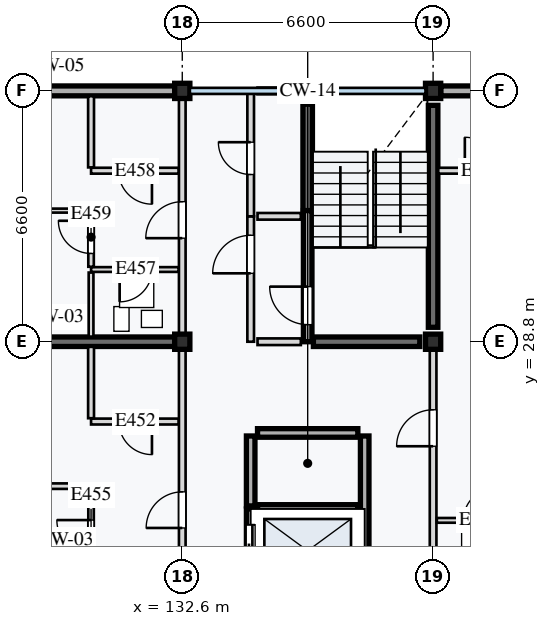
"""IFC4 building model, lengths in metres.
Left out: names, types, materials, properties, quantities, classifications, styles, units other than length and angle.
Written with IfcOpenShell. Run it as: python <this file> out.ifc"""

import sys

from ifc_helpers import new_model, si_unit, direction, frame, frame_2d, origin, origin_2d, place, context, subcontext, project, spatial, rectangle, extrude, element, fill, save


model = new_model("IFC4")
c1 = context("Model", 3, precision=1e-05, world=origin(), true_north=direction((0.0, 1.0)))
c2 = subcontext(c1, "Body", "Model", "MODEL_VIEW")
j1 = project(units=[si_unit("LENGTHUNIT", "METRE"), si_unit("PLANEANGLEUNIT", "RADIAN")], contexts=[c1])
p1 = place(None, origin())
s1 = spatial("IfcSite", under=j1, at=p1, CompositionType="ELEMENT")
p2 = place(p1, origin())
s2 = spatial("IfcBuilding", under=s1, at=p2, CompositionType="ELEMENT")
p3 = place(p2, frame((0.0, 0.0, 40.4)))
s3 = spatial("IfcBuildingStorey", under=s2, at=p3, CompositionType="ELEMENT", Elevation=40.4)
for number, where, z_axis, x_axis in (
    (1, (132.6, 28.8, 0.0), (0.0, 0.0, 1.0), (1.0, 0.0, 0.0)),
    (2, (139.2, 28.8, 0.0), (0.0, 0.0, 1.0), (1.0, 0.0, 0.0)),
    (3, (132.6, 35.4, 0.0), (0.0, 0.0, 1.0), (1.0, 0.0, 0.0)),
    (4, (139.2, 35.4, 0.0), (0.0, 0.0, 1.0), (1.0, 0.0, 0.0)),
):
    element("IfcColumn", number, at=place(p3, frame(where, z_axis=z_axis, x_axis=x_axis)), inside=s3, PredefinedType="COLUMN", context=c2, shape_type="SweptSolid", body=[
        extrude(rectangle(XDim=0.4, YDim=0.4, at=origin_2d()), origin(), (0.0, 0.0, 1.0), 3.2),
    ])
p4 = place(p3, frame((139.2, 29.18, 0.0), z_axis=(0.0, 0.0, 1.0), x_axis=(0.0, 1.0, 0.0)))
e5 = element("IfcWall", 5, at=p4, inside=s3, PredefinedType="SHEAR", context=c2, shape_type="SweptSolid", body=[
    extrude(rectangle(XDim=5.84, YDim=0.25, at=frame_2d((2.92, 0.0))), origin(), (0.0, 0.0, 1.0), 2.94),
])
for number, where, z_axis, x_axis in (
    (6, (135.9, 32.25, 0.0), (0.0, 0.0, 1.0), (0.0, 1.0, 0.0)),
    (7, (136.05, 28.8, 0.0), (0.0, 0.0, 1.0), (1.0, 0.0, 0.0)),
):
    element("IfcWall", number, at=place(p3, frame(where, z_axis=z_axis, x_axis=x_axis)), inside=s3, PredefinedType="SHEAR", context=c2, shape_type="SweptSolid", body=[
        extrude(rectangle(XDim=2.8, YDim=0.25, at=frame_2d((1.4, 0.0))), origin(), (0.0, 0.0, 1.0), 2.94),
    ])
p5 = place(p3, frame((126.2, 28.8, 0.0), z_axis=(0.0, 0.0, 1.0), x_axis=(1.0, 0.0, 0.0)))
e8 = element("IfcWall", 8, at=p5, inside=s3, PredefinedType="SHEAR", context=c2, shape_type="SweptSolid", body=[
    extrude(rectangle(XDim=6.2, YDim=0.25, at=frame_2d((3.1, 0.0))), origin(), (0.0, 0.0, 1.0), 2.94),
])
p6 = place(p3, frame((126.2, 35.4, 0.0), z_axis=(0.0, 0.0, 1.0), x_axis=(1.0, 0.0, 0.0)))
e9 = element("IfcWall", 9, at=p6, inside=s3, PredefinedType="STANDARD", context=c2, shape_type="SweptSolid", body=[
    extrude(rectangle(XDim=6.2, YDim=0.26, at=frame_2d((3.1, 0.0))), origin(), (0.0, 0.0, 1.0), 2.65),
])
p7 = place(p3, frame((139.4, 35.4, 0.0), z_axis=(0.0, 0.0, 1.0), x_axis=(1.0, 0.0, 0.0)))
e10 = element("IfcWall", 10, at=p7, inside=s3, PredefinedType="STANDARD", context=c2, shape_type="SweptSolid", body=[
    extrude(rectangle(XDim=4.07, YDim=0.26, at=frame_2d((2.035, 0.0))), origin(), (0.0, 0.0, 1.0), 2.65),
])
p8 = place(p3, frame((134.4, 22.335, 0.0), z_axis=(0.0, 0.0, 1.0), x_axis=(0.0, 1.0, 0.0)))
e11 = element("IfcWall", 11, at=p8, inside=s3, PredefinedType="STANDARD", context=c2, shape_type="SweptSolid", body=[
    extrude(rectangle(XDim=2.065, YDim=0.225, at=frame_2d((1.032, 0.0))), origin(), (0.0, 0.0, 1.0), 2.94),
])
p9 = place(p8, frame((0.55, 0.0, 0.0)))
e12 = element("IfcOpeningElement", 12, at=p9, cuts=e11, PredefinedType="OPENING", context=c2, shape_type="SweptSolid", body=[
    extrude(rectangle(XDim=1.1, YDim=2.1, at=frame_2d((0.55, 1.05))), frame((0.0, 0.123, 0.0), z_axis=(0.0, -1.0, 0.0), x_axis=(1.0, 0.0, 0.0)), (0.0, 0.0, 1.0), 0.245),
])
p10 = place(p3, frame((134.4, 24.48, 0.0), z_axis=(0.0, 0.0, 1.0), x_axis=(0.0, 1.0, 0.0)))
e13 = element("IfcWall", 13, at=p10, inside=s3, PredefinedType="STANDARD", context=c2, shape_type="SweptSolid", body=[
    extrude(rectangle(XDim=1.84, YDim=0.225, at=frame_2d((0.92, 0.0))), origin(), (0.0, 0.0, 1.0), 2.94),
])
p11 = place(p3, frame((137.4, 22.298, 0.0), z_axis=(0.0, 0.0, 1.0), x_axis=(0.0, 1.0, 0.0)))
e14 = element("IfcWall", 14, at=p11, inside=s3, PredefinedType="STANDARD", context=c2, shape_type="SweptSolid", body=[
    extrude(rectangle(XDim=4.022, YDim=0.225, at=frame_2d((2.011, 0.0))), origin(), (0.0, 0.0, 1.0), 2.94),
])
for number, where, z_axis, x_axis in (
    (15, (134.58, 24.4, 0.0), (0.0, 0.0, 1.0), (1.0, 0.0, 0.0)),
    (16, (134.58, 26.4, 0.0), (0.0, 0.0, 1.0), (1.0, 0.0, 0.0)),
):
    element("IfcWall", number, at=place(p3, frame(where, z_axis=z_axis, x_axis=x_axis)), inside=s3, PredefinedType="STANDARD", context=c2, shape_type="SweptSolid", body=[
        extrude(rectangle(XDim=2.64, YDim=0.225, at=frame_2d((1.32, 0.0))), origin(), (0.0, 0.0, 1.0), 2.94),
    ])
p12 = place(p3, frame((135.9, 28.8, 0.0), z_axis=(0.0, 0.0, 1.0), x_axis=(0.0, 1.0, 0.0)))
e17 = element("IfcWall", 17, at=p12, inside=s3, PredefinedType="STANDARD", context=c2, shape_type="SweptSolid", body=[
    extrude(rectangle(XDim=3.45, YDim=0.225, at=frame_2d((1.725, 0.0))), origin(), (0.0, 0.0, 1.0), 2.94),
])
p13 = place(p12, frame((0.45, 0.0, 0.0)))
e18 = element("IfcOpeningElement", 18, at=p13, cuts=e17, PredefinedType="OPENING", context=c2, shape_type="SweptSolid", body=[
    extrude(rectangle(XDim=1.0, YDim=2.1, at=frame_2d((0.5, 1.05))), frame((0.0, 0.123, 0.0), z_axis=(0.0, -1.0, 0.0), x_axis=(1.0, 0.0, 0.0)), (0.0, 0.0, 1.0), 0.245),
])
p14 = place(p3, frame((134.4, 28.8, 0.0), z_axis=(0.0, 0.0, 1.0), x_axis=(0.0, 1.0, 0.0)))
e19 = element("IfcWall", 19, at=p14, inside=s3, PredefinedType="PARTITIONING", context=c2, shape_type="SweptSolid", body=[
    extrude(rectangle(XDim=3.3, YDim=0.175, at=frame_2d((1.65, 0.0))), origin(), (0.0, 0.0, 1.0), 2.94),
])
p15 = place(p14, frame((1.8, 0.0, 0.0)))
e20 = element("IfcOpeningElement", 20, at=p15, cuts=e19, PredefinedType="OPENING", context=c2, shape_type="SweptSolid", body=[
    extrude(rectangle(XDim=1.0, YDim=2.16, at=frame_2d((0.5, 1.08))), frame((0.0, 0.097, 0.0), z_axis=(0.0, -1.0, 0.0), x_axis=(1.0, 0.0, 0.0)), (0.0, 0.0, 1.0), 0.195),
])
p16 = place(p3, frame((134.4, 32.1, 0.0), z_axis=(0.0, 0.0, 1.0), x_axis=(0.0, 1.0, 0.0)))
e21 = element("IfcWall", 21, at=p16, inside=s3, PredefinedType="PARTITIONING", context=c2, shape_type="SweptSolid", body=[
    extrude(rectangle(XDim=3.3, YDim=0.175, at=frame_2d((1.65, 0.0))), origin(), (0.0, 0.0, 1.0), 2.94),
])
p17 = place(p16, frame((1.1, 0.0, 0.0)))
e22 = element("IfcOpeningElement", 22, at=p17, cuts=e21, PredefinedType="OPENING", context=c2, shape_type="SweptSolid", body=[
    extrude(rectangle(XDim=0.85, YDim=2.0, at=frame_2d((0.425, 1.0))), frame((0.0, 0.097, 0.0), z_axis=(0.0, -1.0, 0.0), x_axis=(1.0, 0.0, 0.0)), (0.0, 0.0, 1.0), 0.195),
])
for number, where, z_axis, x_axis in (
    (23, (134.58, 28.8, 0.0), (0.0, 0.0, 1.0), (1.0, 0.0, 0.0)),
    (24, (134.58, 32.1, 0.0), (0.0, 0.0, 1.0), (1.0, 0.0, 0.0)),
):
    element("IfcWall", number, at=place(p3, frame(where, z_axis=z_axis, x_axis=x_axis)), inside=s3, PredefinedType="PARTITIONING", context=c2, shape_type="SweptSolid", body=[
        extrude(rectangle(XDim=1.14, YDim=0.175, at=frame_2d((0.57, 0.0))), origin(), (0.0, 0.0, 1.0), 2.94),
    ])
p18 = place(p3, frame((134.58, 35.4, 0.0), z_axis=(0.0, 0.0, 1.0), x_axis=(1.0, 0.0, 0.0)))
e25 = element("IfcWall", 25, at=p18, inside=s3, PredefinedType="PARTITIONING", context=c2, shape_type="SweptSolid", body=[
    extrude(rectangle(XDim=1.14, YDim=0.175, at=frame_2d((0.57, 0.0))), origin(), (0.0, 0.0, 1.0), 2.65),
])
p19 = place(p3, frame((132.6, 22.2, 0.0), z_axis=(0.0, 0.0, 1.0), x_axis=(0.0, 1.0, 0.0)))
e26 = element("IfcWall", 26, at=p19, inside=s3, PredefinedType="PARTITIONING", context=c2, shape_type="SweptSolid", body=[
    extrude(rectangle(XDim=6.6, YDim=0.175, at=frame_2d((3.3, 0.0))), origin(), (0.0, 0.0, 1.0), 2.55),
])
p20 = place(p19, frame((1.7, 0.0, 0.0)))
e27 = element("IfcOpeningElement", 27, at=p20, cuts=e26, PredefinedType="OPENING", context=c2, shape_type="SweptSolid", body=[
    extrude(rectangle(XDim=0.95, YDim=2.16, at=frame_2d((0.475, 1.08))), frame((0.0, 0.097, 0.0), z_axis=(0.0, -1.0, 0.0), x_axis=(1.0, 0.0, 0.0)), (0.0, 0.0, 1.0), 0.195),
])
p21 = place(p3, frame((132.502, 26.7, 0.0), z_axis=(0.0, 0.0, 1.0), x_axis=(-1.0, 0.0, 0.0)))
e28 = element("IfcWall", 28, at=p21, inside=s3, PredefinedType="PARTITIONING", context=c2, shape_type="SweptSolid", body=[
    extrude(rectangle(XDim=2.302, YDim=0.155, at=frame_2d((1.151, 0.0))), origin(), (0.0, 0.0, 1.0), 2.94),
])
p22 = place(p21, frame((0.7, 0.0, 0.0)))
e29 = element("IfcOpeningElement", 29, at=p22, cuts=e28, PredefinedType="OPENING", context=c2, shape_type="SweptSolid", body=[
    extrude(rectangle(XDim=0.87, YDim=2.08, at=frame_2d((0.435, 1.04))), frame((0.0, 0.087, 0.0), z_axis=(0.0, -1.0, 0.0), x_axis=(1.0, 0.0, 0.0)), (0.0, 0.0, 1.0), 0.175),
])
p23 = place(p3, frame((130.2, 26.788, 0.0), z_axis=(0.0, 0.0, 1.0), x_axis=(0.0, 1.0, 0.0)))
e30 = element("IfcWall", 30, at=p23, inside=s3, PredefinedType="PARTITIONING", context=c2, shape_type="SweptSolid", body=[
    extrude(rectangle(XDim=1.877, YDim=0.155, at=frame_2d((0.939, 0.0))), origin(), (0.0, 0.0, 1.0), 2.94),
])
p24 = place(p3, frame((130.2, 22.183, 0.0), z_axis=(0.0, 0.0, 1.0), x_axis=(0.0, 1.0, 0.0)))
e31 = element("IfcWall", 31, at=p24, inside=s3, PredefinedType="PARTITIONING", context=c2, shape_type="SweptSolid", body=[
    extrude(rectangle(XDim=2.817, YDim=0.145, at=frame_2d((1.409, 0.0))), origin(), (0.0, 0.0, 1.0), 2.94),
])
p25 = place(p24, frame((1.025, 0.0, 0.0)))
e32 = element("IfcOpeningElement", 32, at=p25, cuts=e31, PredefinedType="OPENING", context=c2, shape_type="SweptSolid", body=[
    extrude(rectangle(XDim=0.9, YDim=2.16, at=frame_2d((0.45, 1.08))), frame((0.0, 0.083, 0.0), z_axis=(0.0, -1.0, 0.0), x_axis=(1.0, 0.0, 0.0)), (0.0, 0.0, 1.0), 0.165),
])
p26 = place(p3, frame((130.117, 25.0, 0.0), z_axis=(0.0, 0.0, 1.0), x_axis=(-1.0, 0.0, 0.0)))
e33 = element("IfcWall", 33, at=p26, inside=s3, PredefinedType="PARTITIONING", context=c2, shape_type="SweptSolid", body=[
    extrude(rectangle(XDim=3.978, YDim=0.145, at=frame_2d((1.989, 0.0))), origin(), (0.0, 0.0, 1.0), 2.94),
])
p27 = place(p3, frame((132.6, 28.8, 0.0), z_axis=(0.0, 0.0, 1.0), x_axis=(0.0, 1.0, 0.0)))
e34 = element("IfcWall", 34, at=p27, inside=s3, PredefinedType="PARTITIONING", context=c2, shape_type="SweptSolid", body=[
    extrude(rectangle(XDim=6.6, YDim=0.175, at=frame_2d((3.3, 0.0))), origin(), (0.0, 0.0, 1.0), 2.55),
])
p28 = place(p27, frame((2.725, 0.0, 0.0)))
e35 = element("IfcOpeningElement", 35, at=p28, cuts=e34, PredefinedType="OPENING", context=c2, shape_type="SweptSolid", body=[
    extrude(rectangle(XDim=0.96, YDim=2.18, at=frame_2d((0.48, 1.09))), frame((0.0, 0.097, 0.0), z_axis=(0.0, -1.0, 0.0), x_axis=(1.0, 0.0, 0.0)), (0.0, 0.0, 1.0), 0.195),
])
p29 = place(p3, frame((132.502, 30.7, 0.0), z_axis=(0.0, 0.0, 1.0), x_axis=(-1.0, 0.0, 0.0)))
e36 = element("IfcWall", 36, at=p29, inside=s3, PredefinedType="PARTITIONING", context=c2, shape_type="SweptSolid", body=[
    extrude(rectangle(XDim=2.302, YDim=0.125, at=frame_2d((1.151, 0.0))), origin(), (0.0, 0.0, 1.0), 2.94),
])
p30 = place(p29, frame((0.7, 0.0, 0.0)))
e37 = element("IfcOpeningElement", 37, at=p30, cuts=e36, PredefinedType="OPENING", context=c2, shape_type="SweptSolid", body=[
    extrude(rectangle(XDim=0.85, YDim=2.04, at=frame_2d((0.425, 1.02))), frame((0.0, 0.073, 0.0), z_axis=(0.0, -1.0, 0.0), x_axis=(1.0, 0.0, 0.0)), (0.0, 0.0, 1.0), 0.145),
])
p31 = place(p3, frame((130.2, 28.935, 0.0), z_axis=(0.0, 0.0, 1.0), x_axis=(0.0, 1.0, 0.0)))
e38 = element("IfcWall", 38, at=p31, inside=s3, PredefinedType="PARTITIONING", context=c2, shape_type="SweptSolid", body=[
    extrude(rectangle(XDim=1.685, YDim=0.125, at=frame_2d((0.843, 0.0))), origin(), (0.0, 0.0, 1.0), 2.94),
])
p32 = place(p3, frame((132.502, 33.3, 0.0), z_axis=(0.0, 0.0, 1.0), x_axis=(-1.0, 0.0, 0.0)))
e39 = element("IfcWall", 39, at=p32, inside=s3, PredefinedType="PARTITIONING", context=c2, shape_type="SweptSolid", body=[
    extrude(rectangle(XDim=2.302, YDim=0.155, at=frame_2d((1.151, 0.0))), origin(), (0.0, 0.0, 1.0), 2.94),
])
p33 = place(p32, frame((0.7, 0.0, 0.0)))
e40 = element("IfcOpeningElement", 40, at=p33, cuts=e39, PredefinedType="OPENING", context=c2, shape_type="SweptSolid", body=[
    extrude(rectangle(XDim=0.88, YDim=2.16, at=frame_2d((0.44, 1.08))), frame((0.0, 0.087, 0.0), z_axis=(0.0, -1.0, 0.0), x_axis=(1.0, 0.0, 0.0)), (0.0, 0.0, 1.0), 0.175),
])
p34 = place(p3, frame((130.2, 33.387, 0.0), z_axis=(0.0, 0.0, 1.0), x_axis=(0.0, 1.0, 0.0)))
e41 = element("IfcWall", 41, at=p34, inside=s3, PredefinedType="PARTITIONING", context=c2, shape_type="SweptSolid", body=[
    extrude(rectangle(XDim=1.873, YDim=0.155, at=frame_2d((0.936, 0.0))), origin(), (0.0, 0.0, 1.0), 2.94),
])
p35 = place(p3, frame((130.2, 30.772, 0.0), z_axis=(0.0, 0.0, 1.0), x_axis=(0.0, 1.0, 0.0)))
e42 = element("IfcWall", 42, at=p35, inside=s3, PredefinedType="PARTITIONING", context=c2, shape_type="SweptSolid", body=[
    extrude(rectangle(XDim=1.478, YDim=0.145, at=frame_2d((0.739, 0.0))), origin(), (0.0, 0.0, 1.0), 2.94),
])
p36 = place(p35, frame((0.35, 0.0, 0.0)))
e43 = element("IfcOpeningElement", 43, at=p36, cuts=e42, PredefinedType="OPENING", context=c2, shape_type="SweptSolid", body=[
    extrude(rectangle(XDim=0.86, YDim=2.12, at=frame_2d((0.43, 1.06))), frame((0.0, 0.083, 0.0), z_axis=(0.0, -1.0, 0.0), x_axis=(1.0, 0.0, 0.0)), (0.0, 0.0, 1.0), 0.165),
])
p37 = place(p3, frame((130.117, 32.25, 0.0), z_axis=(0.0, 0.0, 1.0), x_axis=(-1.0, 0.0, 0.0)))
e44 = element("IfcWall", 44, at=p37, inside=s3, PredefinedType="PARTITIONING", context=c2, shape_type="SweptSolid", body=[
    extrude(rectangle(XDim=3.978, YDim=0.105, at=frame_2d((1.989, 0.0))), origin(), (0.0, 0.0, 1.0), 2.94),
])
p38 = place(p3, frame((139.2, 22.2, 0.0), z_axis=(0.0, 0.0, 1.0), x_axis=(0.0, 1.0, 0.0)))
e45 = element("IfcWall", 45, at=p38, inside=s3, PredefinedType="PARTITIONING", context=c2, shape_type="SweptSolid", body=[
    extrude(rectangle(XDim=6.6, YDim=0.175, at=frame_2d((3.3, 0.0))), origin(), (0.0, 0.0, 1.0), 2.55),
])
p39 = place(p38, frame((3.85, 0.0, 0.0)))
e46 = element("IfcOpeningElement", 46, at=p39, cuts=e45, PredefinedType="OPENING", context=c2, shape_type="SweptSolid", body=[
    extrude(rectangle(XDim=0.96, YDim=2.18, at=frame_2d((0.48, 1.09))), frame((0.0, 0.097, 0.0), z_axis=(0.0, -1.0, 0.0), x_axis=(1.0, 0.0, 0.0)), (0.0, 0.0, 1.0), 0.195),
])
p40 = place(p3, frame((139.298, 24.1, 0.0), z_axis=(0.0, 0.0, 1.0), x_axis=(1.0, 0.0, 0.0)))
e47 = element("IfcWall", 47, at=p40, inside=s3, PredefinedType="PARTITIONING", context=c2, shape_type="SweptSolid", body=[
    extrude(rectangle(XDim=2.302, YDim=0.125, at=frame_2d((1.151, 0.0))), origin(), (0.0, 0.0, 1.0), 2.94),
])
p41 = place(p40, frame((0.7, 0.0, 0.0)))
e48 = element("IfcOpeningElement", 48, at=p41, cuts=e47, PredefinedType="OPENING", context=c2, shape_type="SweptSolid", body=[
    extrude(rectangle(XDim=0.85, YDim=2.04, at=frame_2d((0.425, 1.02))), frame((0.0, 0.073, 0.0), z_axis=(0.0, -1.0, 0.0), x_axis=(1.0, 0.0, 0.0)), (0.0, 0.0, 1.0), 0.145),
])
p42 = place(p3, frame((139.335, 33.3, 0.0), z_axis=(0.0, 0.0, 1.0), x_axis=(1.0, 0.0, 0.0)))
e49 = element("IfcWall", 49, at=p42, inside=s3, PredefinedType="PARTITIONING", context=c2, shape_type="SweptSolid", body=[
    extrude(rectangle(XDim=2.265, YDim=0.155, at=frame_2d((1.133, 0.0))), origin(), (0.0, 0.0, 1.0), 2.94),
])
p43 = place(p42, frame((0.7, 0.0, 0.0)))
e50 = element("IfcOpeningElement", 50, at=p43, cuts=e49, PredefinedType="OPENING", context=c2, shape_type="SweptSolid", body=[
    extrude(rectangle(XDim=0.88, YDim=2.1, at=frame_2d((0.44, 1.05))), frame((0.0, 0.087, 0.0), z_axis=(0.0, -1.0, 0.0), x_axis=(1.0, 0.0, 0.0)), (0.0, 0.0, 1.0), 0.175),
])
p44 = place(p9, origin())
e51 = element("IfcDoor", 51, at=p44, inside=s3, OperationType="DOUBLE_DOOR_SLIDING", PredefinedType="DOOR", context=c2, shape_type="SweptSolid", body=[
    extrude(rectangle(XDim=1.1, YDim=2.1, at=frame_2d((0.55, 1.05))), frame((0.0, 0.025, 0.0), z_axis=(0.0, -1.0, 0.0), x_axis=(1.0, 0.0, 0.0)), (0.0, 0.0, 1.0), 0.05),
])
fill(e12, e51)
p45 = place(p13, origin())
e52 = element("IfcDoor", 52, at=p45, inside=s3, OperationType="SINGLE_SWING_RIGHT", PredefinedType="DOOR", context=c2, shape_type="SweptSolid", body=[
    extrude(rectangle(XDim=1.0, YDim=2.1, at=frame_2d((0.5, 1.05))), frame((0.0, 0.025, 0.0), z_axis=(0.0, -1.0, 0.0), x_axis=(1.0, 0.0, 0.0)), (0.0, 0.0, 1.0), 0.05),
])
fill(e18, e52)
p46 = place(p15, origin())
e53 = element("IfcDoor", 53, at=p46, inside=s3, OperationType="SINGLE_SWING_LEFT", PredefinedType="DOOR", context=c2, shape_type="SweptSolid", body=[
    extrude(rectangle(XDim=1.0, YDim=2.16, at=frame_2d((0.5, 1.08))), frame((0.0, 0.025, 0.0), z_axis=(0.0, -1.0, 0.0), x_axis=(1.0, 0.0, 0.0)), (0.0, 0.0, 1.0), 0.05),
])
fill(e20, e53)
p47 = place(p17, origin())
e54 = element("IfcDoor", 54, at=p47, inside=s3, OperationType="SINGLE_SWING_RIGHT", PredefinedType="DOOR", context=c2, shape_type="SweptSolid", body=[
    extrude(rectangle(XDim=0.85, YDim=2.0, at=frame_2d((0.425, 1.0))), frame((0.0, 0.025, 0.0), z_axis=(0.0, -1.0, 0.0), x_axis=(1.0, 0.0, 0.0)), (0.0, 0.0, 1.0), 0.05),
])
fill(e22, e54)
p48 = place(p20, origin())
e55 = element("IfcDoor", 55, at=p48, inside=s3, OperationType="SINGLE_SWING_LEFT", PredefinedType="DOOR", context=c2, shape_type="SweptSolid", body=[
    extrude(rectangle(XDim=0.95, YDim=2.16, at=frame_2d((0.475, 1.08))), frame((0.0, 0.025, 0.0), z_axis=(0.0, -1.0, 0.0), x_axis=(1.0, 0.0, 0.0)), (0.0, 0.0, 1.0), 0.05),
])
fill(e27, e55)
p49 = place(p22, origin())
e56 = element("IfcDoor", 56, at=p49, inside=s3, OperationType="SINGLE_SWING_LEFT", PredefinedType="DOOR", context=c2, shape_type="SweptSolid", body=[
    extrude(rectangle(XDim=0.87, YDim=2.08, at=frame_2d((0.435, 1.04))), frame((0.0, 0.025, 0.0), z_axis=(0.0, -1.0, 0.0), x_axis=(1.0, 0.0, 0.0)), (0.0, 0.0, 1.0), 0.05),
])
fill(e29, e56)
p50 = place(p25, origin())
e57 = element("IfcDoor", 57, at=p50, inside=s3, OperationType="SINGLE_SWING_RIGHT", PredefinedType="DOOR", context=c2, shape_type="SweptSolid", body=[
    extrude(rectangle(XDim=0.9, YDim=2.16, at=frame_2d((0.45, 1.08))), frame((0.0, 0.025, 0.0), z_axis=(0.0, -1.0, 0.0), x_axis=(1.0, 0.0, 0.0)), (0.0, 0.0, 1.0), 0.05),
])
fill(e32, e57)
p51 = place(p28, origin())
e58 = element("IfcDoor", 58, at=p51, inside=s3, OperationType="SINGLE_SWING_LEFT", PredefinedType="DOOR", context=c2, shape_type="SweptSolid", body=[
    extrude(rectangle(XDim=0.96, YDim=2.18, at=frame_2d((0.48, 1.09))), frame((0.0, 0.025, 0.0), z_axis=(0.0, -1.0, 0.0), x_axis=(1.0, 0.0, 0.0)), (0.0, 0.0, 1.0), 0.05),
])
fill(e35, e58)
p52 = place(p30, origin())
e59 = element("IfcDoor", 59, at=p52, inside=s3, OperationType="SINGLE_SWING_RIGHT", PredefinedType="DOOR", context=c2, shape_type="SweptSolid", body=[
    extrude(rectangle(XDim=0.85, YDim=2.04, at=frame_2d((0.425, 1.02))), frame((0.0, 0.025, 0.0), z_axis=(0.0, -1.0, 0.0), x_axis=(1.0, 0.0, 0.0)), (0.0, 0.0, 1.0), 0.05),
])
fill(e37, e59)
p53 = place(p33, origin())
e60 = element("IfcDoor", 60, at=p53, inside=s3, OperationType="SINGLE_SWING_LEFT", PredefinedType="DOOR", context=c2, shape_type="SweptSolid", body=[
    extrude(rectangle(XDim=0.88, YDim=2.16, at=frame_2d((0.44, 1.08))), frame((0.0, 0.025, 0.0), z_axis=(0.0, -1.0, 0.0), x_axis=(1.0, 0.0, 0.0)), (0.0, 0.0, 1.0), 0.05),
])
fill(e40, e60)
p54 = place(p36, origin())
e61 = element("IfcDoor", 61, at=p54, inside=s3, OperationType="SINGLE_SWING_RIGHT", PredefinedType="DOOR", context=c2, shape_type="SweptSolid", body=[
    extrude(rectangle(XDim=0.86, YDim=2.12, at=frame_2d((0.43, 1.06))), frame((0.0, 0.025, 0.0), z_axis=(0.0, -1.0, 0.0), x_axis=(1.0, 0.0, 0.0)), (0.0, 0.0, 1.0), 0.05),
])
fill(e43, e61)
p55 = place(p39, origin())
e62 = element("IfcDoor", 62, at=p55, inside=s3, OperationType="SINGLE_SWING_LEFT", PredefinedType="DOOR", context=c2, shape_type="SweptSolid", body=[
    extrude(rectangle(XDim=0.96, YDim=2.18, at=frame_2d((0.48, 1.09))), frame((0.0, 0.025, 0.0), z_axis=(0.0, -1.0, 0.0), x_axis=(1.0, 0.0, 0.0)), (0.0, 0.0, 1.0), 0.05),
])
fill(e46, e62)
p56 = place(p41, origin())
e63 = element("IfcDoor", 63, at=p56, inside=s3, OperationType="SINGLE_SWING_RIGHT", PredefinedType="DOOR", context=c2, shape_type="SweptSolid", body=[
    extrude(rectangle(XDim=0.85, YDim=2.04, at=frame_2d((0.425, 1.02))), frame((0.0, 0.025, 0.0), z_axis=(0.0, -1.0, 0.0), x_axis=(1.0, 0.0, 0.0)), (0.0, 0.0, 1.0), 0.05),
])
fill(e48, e63)
p57 = place(p43, origin())
e64 = element("IfcDoor", 64, at=p57, inside=s3, OperationType="SINGLE_SWING_LEFT", PredefinedType="DOOR", context=c2, shape_type="SweptSolid", body=[
    extrude(rectangle(XDim=0.88, YDim=2.1, at=frame_2d((0.44, 1.05))), frame((0.0, 0.025, 0.0), z_axis=(0.0, -1.0, 0.0), x_axis=(1.0, 0.0, 0.0)), (0.0, 0.0, 1.0), 0.05),
])
fill(e50, e64)
save(model, sys.argv[1])
